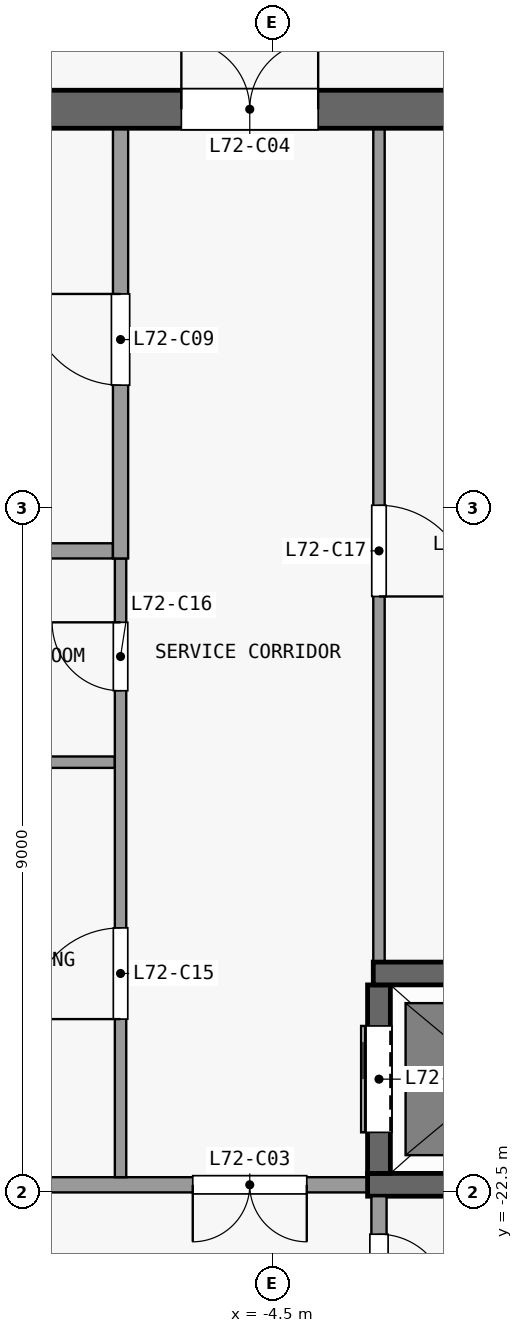
"""IFC4 building model, lengths in metres.
Left out: names, types, materials, properties, quantities, classifications, styles, units other than length and angle.
Written with IfcOpenShell. Run it as: python <this file> out.ifc"""

import sys

from ifc_helpers import new_model, si_unit, direction, frame, frame_2d, origin, place, context, subcontext, project, spatial, rectangle, extrude, element, fill, save


model = new_model("IFC4")
c1 = context("Model", 3, precision=1e-05, world=origin(), true_north=direction((0.0, 1.0)))
c2 = subcontext(c1, "Body", "Model", "MODEL_VIEW")
j1 = project(units=[si_unit("LENGTHUNIT", "METRE"), si_unit("PLANEANGLEUNIT", "RADIAN")], contexts=[c1])
p1 = place(None, origin())
s1 = spatial("IfcSite", under=j1, at=p1, CompositionType="ELEMENT")
p2 = place(p1, origin())
s2 = spatial("IfcBuilding", under=s1, at=p2, CompositionType="ELEMENT")
p3 = place(p2, frame((0.0, 0.0, 284.3)))
s3 = spatial("IfcBuildingStorey", under=s2, at=p3, CompositionType="ELEMENT", Elevation=284.3)
p4 = place(p3, frame((-13.1, -8.25, 0.0), z_axis=(0.0, 0.0, 1.0), x_axis=(1.0, 0.0, 0.0)))
e1 = element("IfcWall", 1, at=p4, inside=s3, PredefinedType="SHEAR", context=c2, shape_type="SweptSolid", body=[
    extrude(rectangle(XDim=26.2, YDim=0.5, at=frame_2d((13.1, 0.0))), origin(), (0.0, 0.0, 1.0), 3.3),
])
p5 = place(p4, frame((7.4, 0.0, 0.0)))
e2 = element("IfcOpeningElement", 2, at=p5, cuts=e1, PredefinedType="OPENING", context=c2, shape_type="SweptSolid", body=[
    extrude(rectangle(XDim=1.8, YDim=2.1, at=frame_2d((0.9, 1.05))), frame((0.0, 0.26, 0.0), z_axis=(0.0, -1.0, 0.0), x_axis=(1.0, 0.0, 0.0)), (0.0, 0.0, 1.0), 0.52),
])
p6 = place(p4, frame((17.0, 0.0, 0.0)))
e3 = element("IfcOpeningElement", 3, at=p6, cuts=e1, PredefinedType="OPENING", context=c2, shape_type="SweptSolid", body=[
    extrude(rectangle(XDim=1.8, YDim=2.1, at=frame_2d((0.9, 1.05))), frame((0.0, 0.26, 0.0), z_axis=(0.0, -1.0, 0.0), x_axis=(1.0, 0.0, 0.0)), (0.0, 0.0, 1.0), 0.52),
])
p7 = place(p4, frame((2.325, 0.0, 0.0)))
e4 = element("IfcOpeningElement", 4, at=p7, cuts=e1, PredefinedType="OPENING", context=c2, shape_type="SweptSolid", body=[
    extrude(rectangle(XDim=0.9, YDim=2.1, at=frame_2d((0.45, 1.05))), frame((0.0, 0.26, 0.0), z_axis=(0.0, -1.0, 0.0), x_axis=(1.0, 0.0, 0.0)), (0.0, 0.0, 1.0), 0.52),
])
p8 = place(p4, frame((22.975, 0.0, 0.0)))
e5 = element("IfcOpeningElement", 5, at=p8, cuts=e1, PredefinedType="OPENING", context=c2, shape_type="SweptSolid", body=[
    extrude(rectangle(XDim=0.9, YDim=2.1, at=frame_2d((0.45, 1.05))), frame((0.0, 0.26, 0.0), z_axis=(0.0, -1.0, 0.0), x_axis=(1.0, 0.0, 0.0)), (0.0, 0.0, 1.0), 0.52),
])
p9 = place(p3, frame((-3.25, -22.4, 0.0), z_axis=(0.0, 0.0, 1.0), x_axis=(-1.0, 0.0, 0.0)))
e6 = element("IfcWall", 6, at=p9, inside=s3, PredefinedType="PARTITIONING", context=c2, shape_type="SweptSolid", body=[
    extrude(rectangle(XDim=6.2, YDim=0.2, at=frame_2d((3.1, 0.0))), origin(), (0.0, 0.0, 1.0), 3.3),
])
p10 = place(p9, frame((0.8, 0.0, 0.0)))
e7 = element("IfcOpeningElement", 7, at=p10, cuts=e6, PredefinedType="OPENING", context=c2, shape_type="SweptSolid", body=[
    extrude(rectangle(XDim=1.5, YDim=2.1, at=frame_2d((0.75, 1.05))), frame((0.0, 0.11, 0.0), z_axis=(0.0, -1.0, 0.0), x_axis=(1.0, 0.0, 0.0)), (0.0, 0.0, 1.0), 0.22),
])
p11 = place(p3, frame((-3.25, -22.4, 0.0), z_axis=(0.0, 0.0, 1.0), x_axis=(1.0, 0.0, 0.0)))
e8 = element("IfcWall", 8, at=p11, inside=s3, PredefinedType="SHEAR", context=c2, shape_type="SweptSolid", body=[
    extrude(rectangle(XDim=6.5, YDim=0.3, at=frame_2d((3.25, 0.0))), origin(), (0.0, 0.0, 1.0), 3.3),
])
p12 = place(p3, frame((-3.175, -19.62, 0.0), z_axis=(0.0, 0.0, 1.0), x_axis=(1.0, 0.0, 0.0)))
e9 = element("IfcWall", 9, at=p12, inside=s3, PredefinedType="SHEAR", context=c2, shape_type="SweptSolid", body=[
    extrude(rectangle(XDim=3.025, YDim=0.3, at=frame_2d((1.513, 0.0))), origin(), (0.0, 0.0, 1.0), 3.3),
])
p13 = place(p3, frame((-9.5, -16.84, 0.0), z_axis=(0.0, 0.0, 1.0), x_axis=(1.0, 0.0, 0.0)))
e10 = element("IfcWall", 10, at=p13, inside=s3, PredefinedType="PARTITIONING", context=c2, shape_type="SweptSolid", body=[
    extrude(rectangle(XDim=2.925, YDim=0.15, at=frame_2d((1.462, 0.0))), origin(), (0.0, 0.0, 1.0), 3.3),
])
p14 = place(p3, frame((-9.5, -14.06, 0.0), z_axis=(0.0, 0.0, 1.0), x_axis=(1.0, 0.0, 0.0)))
e11 = element("IfcWall", 11, at=p14, inside=s3, PredefinedType="PARTITIONING", context=c2, shape_type="SweptSolid", body=[
    extrude(rectangle(XDim=2.9, YDim=0.2, at=frame_2d((1.45, 0.0))), origin(), (0.0, 0.0, 1.0), 3.3),
])
p15 = place(p3, frame((-6.5, -22.3, 0.0), z_axis=(0.0, 0.0, 1.0), x_axis=(0.0, 1.0, 0.0)))
e12 = element("IfcWall", 12, at=p15, inside=s3, PredefinedType="PARTITIONING", context=c2, shape_type="SweptSolid", body=[
    extrude(rectangle(XDim=8.14, YDim=0.15, at=frame_2d((4.07, 0.0))), origin(), (0.0, 0.0, 1.0), 3.3),
])
p16 = place(p15, frame((2.08, 0.0, 0.0)))
e13 = element("IfcOpeningElement", 13, at=p16, cuts=e12, PredefinedType="OPENING", context=c2, shape_type="SweptSolid", body=[
    extrude(rectangle(XDim=1.2, YDim=2.1, at=frame_2d((0.6, 1.05))), frame((0.0, 0.085, 0.0), z_axis=(0.0, -1.0, 0.0), x_axis=(1.0, 0.0, 0.0)), (0.0, 0.0, 1.0), 0.17),
])
p17 = place(p15, frame((6.4, 0.0, 0.0)))
e14 = element("IfcOpeningElement", 14, at=p17, cuts=e12, PredefinedType="OPENING", context=c2, shape_type="SweptSolid", body=[
    extrude(rectangle(XDim=0.9, YDim=2.1, at=frame_2d((0.45, 1.05))), frame((0.0, 0.085, 0.0), z_axis=(0.0, -1.0, 0.0), x_axis=(1.0, 0.0, 0.0)), (0.0, 0.0, 1.0), 0.17),
])
p18 = place(p3, frame((-6.5, -14.16, 0.0), z_axis=(0.0, 0.0, 1.0), x_axis=(0.0, 1.0, 0.0)))
e15 = element("IfcWall", 15, at=p18, inside=s3, PredefinedType="PARTITIONING", context=c2, shape_type="SweptSolid", body=[
    extrude(rectangle(XDim=5.66, YDim=0.2, at=frame_2d((2.83, 0.0))), origin(), (0.0, 0.0, 1.0), 3.3),
])
p19 = place(p18, frame((2.28, 0.0, 0.0)))
e16 = element("IfcOpeningElement", 16, at=p19, cuts=e15, PredefinedType="OPENING", context=c2, shape_type="SweptSolid", body=[
    extrude(rectangle(XDim=1.2, YDim=2.1, at=frame_2d((0.6, 1.05))), frame((0.0, 0.11, 0.0), z_axis=(0.0, -1.0, 0.0), x_axis=(1.0, 0.0, 0.0)), (0.0, 0.0, 1.0), 0.22),
])
p20 = place(p3, frame((-3.1, -22.55, 0.0), z_axis=(0.0, 0.0, 1.0), x_axis=(0.0, -1.0, 0.0)))
e17 = element("IfcWall", 17, at=p20, inside=s3, PredefinedType="PARTITIONING", context=c2, shape_type="SweptSolid", body=[
    extrude(rectangle(XDim=2.05, YDim=0.2, at=frame_2d((1.025, 0.0))), origin(), (0.0, 0.0, 1.0), 3.3),
])
p21 = place(p20, frame((0.5, 0.0, 0.0)))
e18 = element("IfcOpeningElement", 18, at=p21, cuts=e17, PredefinedType="OPENING", context=c2, shape_type="SweptSolid", body=[
    extrude(rectangle(XDim=0.9, YDim=2.1, at=frame_2d((0.45, 1.05))), frame((0.0, 0.11, 0.0), z_axis=(0.0, -1.0, 0.0), x_axis=(1.0, 0.0, 0.0)), (0.0, 0.0, 1.0), 0.22),
])
p22 = place(p3, frame((-3.1, -22.25, 0.0), z_axis=(0.0, 0.0, 1.0), x_axis=(0.0, 1.0, 0.0)))
e19 = element("IfcWall", 19, at=p22, inside=s3, PredefinedType="SHEAR", context=c2, shape_type="SweptSolid", body=[
    extrude(rectangle(XDim=2.48, YDim=0.3, at=frame_2d((1.24, 0.0))), origin(), (0.0, 0.0, 1.0), 3.3),
])
p23 = place(p22, frame((0.54, 0.0, 0.0)))
e20 = element("IfcOpeningElement", 20, at=p23, cuts=e19, PredefinedType="OPENING", context=c2, shape_type="SweptSolid", body=[
    extrude(rectangle(XDim=1.4, YDim=2.1, at=frame_2d((0.7, 1.05))), frame((0.0, 0.16, 0.0), z_axis=(0.0, -1.0, 0.0), x_axis=(1.0, 0.0, 0.0)), (0.0, 0.0, 1.0), 0.32),
])
p24 = place(p3, frame((-3.1, -8.5, 0.0), z_axis=(0.0, 0.0, 1.0), x_axis=(0.0, -1.0, 0.0)))
e21 = element("IfcWall", 21, at=p24, inside=s3, PredefinedType="PARTITIONING", context=c2, shape_type="SweptSolid", body=[
    extrude(rectangle(XDim=10.97, YDim=0.15, at=frame_2d((5.485, 0.0))), origin(), (0.0, 0.0, 1.0), 3.3),
])
p25 = place(p24, frame((4.96, 0.0, 0.0)))
e22 = element("IfcOpeningElement", 22, at=p25, cuts=e21, PredefinedType="OPENING", context=c2, shape_type="SweptSolid", body=[
    extrude(rectangle(XDim=1.2, YDim=2.1, at=frame_2d((0.6, 1.05))), frame((0.0, 0.085, 0.0), z_axis=(0.0, -1.0, 0.0), x_axis=(1.0, 0.0, 0.0)), (0.0, 0.0, 1.0), 0.17),
])
p26 = place(p23, origin())
e23 = element("IfcDoor", 23, at=p26, inside=s3, OperationType="DOUBLE_DOOR_SLIDING", PredefinedType="DOOR", context=c2, shape_type="SweptSolid", body=[
    extrude(rectangle(XDim=1.4, YDim=2.1, at=frame_2d((0.7, 1.05))), frame((0.0, 0.025, 0.0), z_axis=(0.0, -1.0, 0.0), x_axis=(1.0, 0.0, 0.0)), (0.0, 0.0, 1.0), 0.05),
])
fill(e20, e23)
p27 = place(p10, origin())
e24 = element("IfcDoor", 24, at=p27, inside=s3, OperationType="DOUBLE_DOOR_SINGLE_SWING", PredefinedType="DOOR", context=c2, shape_type="SweptSolid", body=[
    extrude(rectangle(XDim=1.5, YDim=2.1, at=frame_2d((0.75, 1.05))), frame((0.0, 0.025, 0.0), z_axis=(0.0, -1.0, 0.0), x_axis=(1.0, 0.0, 0.0)), (0.0, 0.0, 1.0), 0.05),
])
fill(e7, e24)
p28 = place(p5, origin())
e25 = element("IfcDoor", 25, at=p28, inside=s3, OperationType="DOUBLE_DOOR_SINGLE_SWING", PredefinedType="DOOR", context=c2, shape_type="SweptSolid", body=[
    extrude(rectangle(XDim=1.8, YDim=2.1, at=frame_2d((0.9, 1.05))), frame((0.0, 0.025, 0.0), z_axis=(0.0, -1.0, 0.0), x_axis=(1.0, 0.0, 0.0)), (0.0, 0.0, 1.0), 0.05),
])
fill(e2, e25)
p29 = place(p19, origin())
e26 = element("IfcDoor", 26, at=p29, inside=s3, OperationType="SINGLE_SWING_RIGHT", PredefinedType="DOOR", context=c2, shape_type="SweptSolid", body=[
    extrude(rectangle(XDim=1.2, YDim=2.1, at=frame_2d((0.6, 1.05))), frame((0.0, 0.025, 0.0), z_axis=(0.0, -1.0, 0.0), x_axis=(1.0, 0.0, 0.0)), (0.0, 0.0, 1.0), 0.05),
])
fill(e16, e26)
p30 = place(p21, origin())
e27 = element("IfcDoor", 27, at=p30, inside=s3, OperationType="SINGLE_SWING_RIGHT", PredefinedType="DOOR", context=c2, shape_type="SweptSolid", body=[
    extrude(rectangle(XDim=0.9, YDim=2.1, at=frame_2d((0.45, 1.05))), frame((0.0, 0.025, 0.0), z_axis=(0.0, -1.0, 0.0), x_axis=(1.0, 0.0, 0.0)), (0.0, 0.0, 1.0), 0.05),
])
fill(e18, e27)
p31 = place(p16, origin())
e28 = element("IfcDoor", 28, at=p31, inside=s3, OperationType="SINGLE_SWING_LEFT", PredefinedType="DOOR", context=c2, shape_type="SweptSolid", body=[
    extrude(rectangle(XDim=1.2, YDim=2.1, at=frame_2d((0.6, 1.05))), frame((0.0, 0.025, 0.0), z_axis=(0.0, -1.0, 0.0), x_axis=(1.0, 0.0, 0.0)), (0.0, 0.0, 1.0), 0.05),
])
fill(e13, e28)
p32 = place(p17, origin())
e29 = element("IfcDoor", 29, at=p32, inside=s3, OperationType="SINGLE_SWING_RIGHT", PredefinedType="DOOR", context=c2, shape_type="SweptSolid", body=[
    extrude(rectangle(XDim=0.9, YDim=2.1, at=frame_2d((0.45, 1.05))), frame((0.0, 0.025, 0.0), z_axis=(0.0, -1.0, 0.0), x_axis=(1.0, 0.0, 0.0)), (0.0, 0.0, 1.0), 0.05),
])
fill(e14, e29)
p33 = place(p25, origin())
e30 = element("IfcDoor", 30, at=p33, inside=s3, OperationType="SINGLE_SWING_RIGHT", PredefinedType="DOOR", context=c2, shape_type="SweptSolid", body=[
    extrude(rectangle(XDim=1.2, YDim=2.1, at=frame_2d((0.6, 1.05))), frame((0.0, 0.025, 0.0), z_axis=(0.0, -1.0, 0.0), x_axis=(1.0, 0.0, 0.0)), (0.0, 0.0, 1.0), 0.05),
])
fill(e22, e30)
save(model, sys.argv[1])
